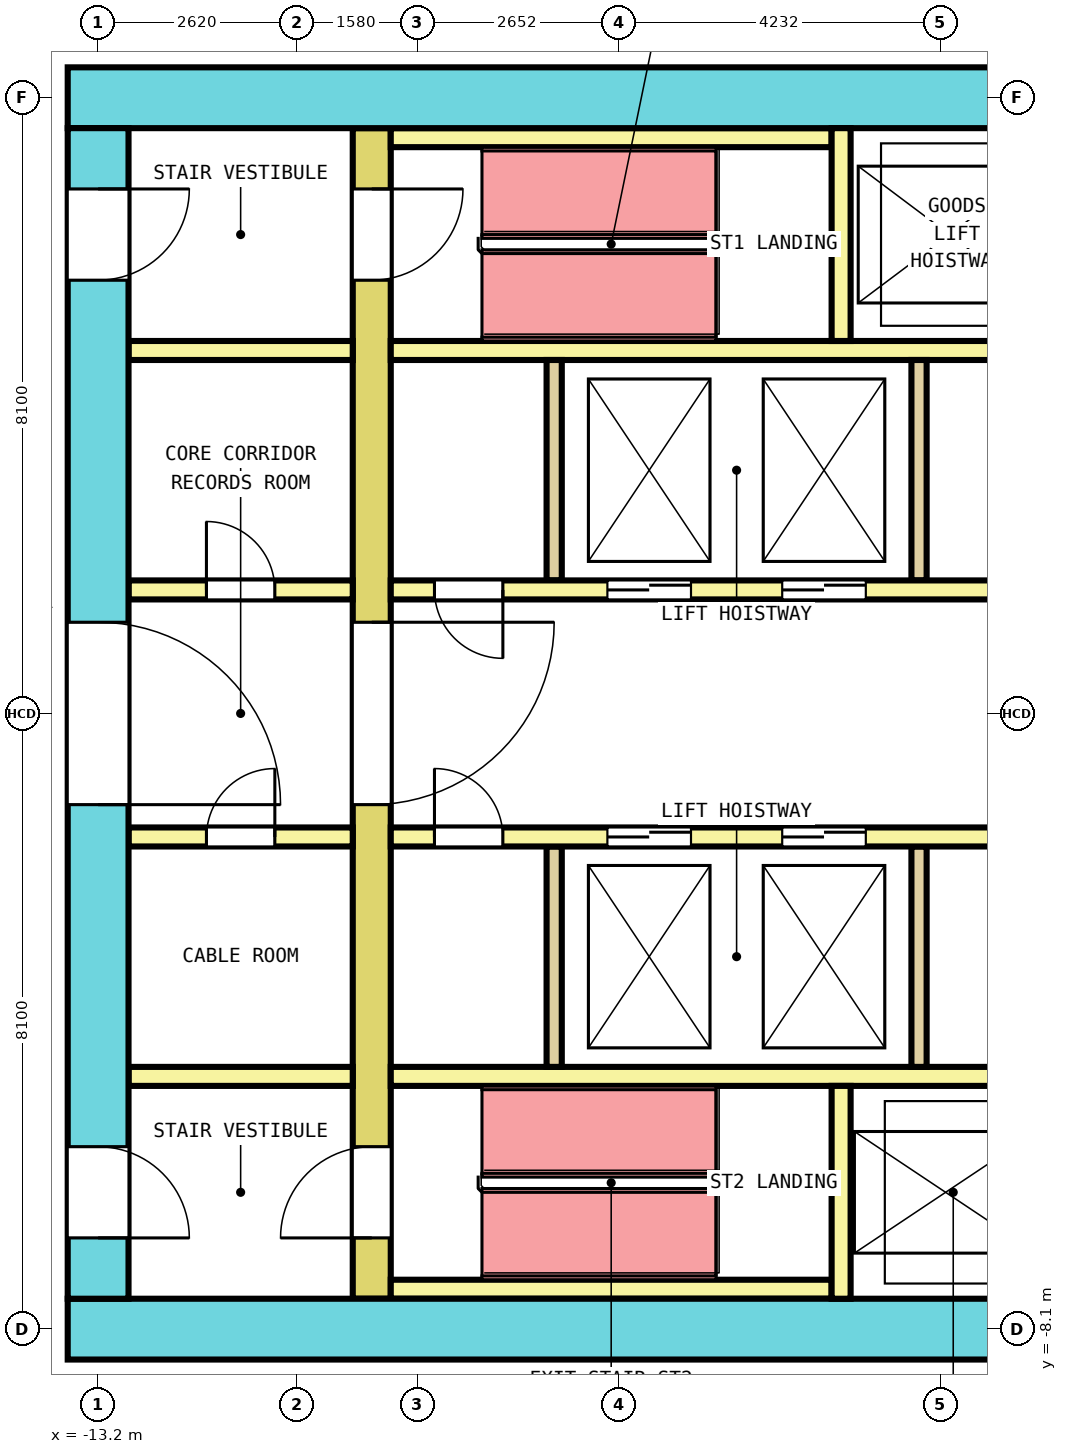
"""IFC4 building model, lengths in metres.
Left out: names, types, materials, properties, quantities, classifications, styles, units other than length and angle.
Written with IfcOpenShell. Run it as: python <this file> out.ifc"""

import sys

from ifc_helpers import new_model, si_unit, direction, frame, frame_2d, origin, place, context, subcontext, project, spatial, rectangle, extrude, element, fill, save


model = new_model("IFC4")
c1 = context("Model", 3, precision=1e-05, world=origin(), true_north=direction((0.0, 1.0)))
c2 = subcontext(c1, "Body", "Model", "MODEL_VIEW")
j1 = project(units=[si_unit("LENGTHUNIT", "METRE"), si_unit("PLANEANGLEUNIT", "RADIAN")], contexts=[c1])
p1 = place(None, origin())
s1 = spatial("IfcSite", under=j1, at=p1, CompositionType="ELEMENT")
p2 = place(p1, origin())
s2 = spatial("IfcBuilding", under=s1, at=p2, CompositionType="ELEMENT")
p3 = place(p2, frame((0.0, 0.0, 126.4)))
s3 = spatial("IfcBuildingStorey", under=s2, at=p3, CompositionType="ELEMENT", Elevation=126.4)
p4 = place(p3, frame((-13.6, 8.1, 0.0), z_axis=(0.0, 0.0, 1.0), x_axis=(1.0, 0.0, 0.0)))
e1 = element("IfcWall", 1, at=p4, inside=s3, PredefinedType="SHEAR", context=c2, shape_type="SweptSolid", body=[
    extrude(rectangle(XDim=27.2, YDim=0.8, at=frame_2d((13.6, 0.0))), origin(), (0.0, 0.0, 1.0), 4.1),
])
p5 = place(p4, frame((14.525, 0.0, 0.0)))
e2 = element("IfcOpeningElement", 2, at=p5, cuts=e1, PredefinedType="OPENING", context=c2, shape_type="SweptSolid", body=[
    extrude(rectangle(XDim=1.4, YDim=2.1, at=frame_2d((0.7, 1.05))), frame((0.0, 0.41, 0.0), z_axis=(0.0, -1.0, 0.0), x_axis=(1.0, 0.0, 0.0)), (0.0, 0.0, 1.0), 0.82),
])
p6 = place(p3, frame((-13.6, -8.1, 0.0), z_axis=(0.0, 0.0, 1.0), x_axis=(1.0, 0.0, 0.0)))
e3 = element("IfcWall", 3, at=p6, inside=s3, PredefinedType="SHEAR", context=c2, shape_type="SweptSolid", body=[
    extrude(rectangle(XDim=27.2, YDim=0.8, at=frame_2d((13.6, 0.0))), origin(), (0.0, 0.0, 1.0), 4.1),
])
p7 = place(p6, frame((15.15, 0.0, 0.0)))
e4 = element("IfcOpeningElement", 4, at=p7, cuts=e3, PredefinedType="OPENING", context=c2, shape_type="SweptSolid", body=[
    extrude(rectangle(XDim=1.2, YDim=2.1, at=frame_2d((0.6, 1.05))), frame((0.0, 0.41, 0.0), z_axis=(0.0, -1.0, 0.0), x_axis=(1.0, 0.0, 0.0)), (0.0, 0.0, 1.0), 0.82),
])
p8 = place(p3, frame((-13.2, -7.7, 0.0), z_axis=(0.0, 0.0, 1.0), x_axis=(0.0, 1.0, 0.0)))
e5 = element("IfcWall", 5, at=p8, inside=s3, PredefinedType="SHEAR", context=c2, shape_type="SweptSolid", body=[
    extrude(rectangle(XDim=15.4, YDim=0.8, at=frame_2d((7.7, 0.0))), origin(), (0.0, 0.0, 1.0), 4.1),
])
p9 = place(p8, frame((6.5, 0.0, 0.0)))
e6 = element("IfcOpeningElement", 6, at=p9, cuts=e5, PredefinedType="OPENING", context=c2, shape_type="SweptSolid", body=[
    extrude(rectangle(XDim=2.4, YDim=2.1, at=frame_2d((1.2, 1.05))), frame((0.0, 0.41, 0.0), z_axis=(0.0, -1.0, 0.0), x_axis=(1.0, 0.0, 0.0)), (0.0, 0.0, 1.0), 0.82),
])
p10 = place(p8, frame((13.4, 0.0, 0.0)))
e7 = element("IfcOpeningElement", 7, at=p10, cuts=e5, PredefinedType="OPENING", context=c2, shape_type="SweptSolid", body=[
    extrude(rectangle(XDim=1.2, YDim=2.1, at=frame_2d((0.6, 1.05))), frame((0.0, 0.41, 0.0), z_axis=(0.0, -1.0, 0.0), x_axis=(1.0, 0.0, 0.0)), (0.0, 0.0, 1.0), 0.82),
])
p11 = place(p8, frame((0.8, 0.0, 0.0)))
e8 = element("IfcOpeningElement", 8, at=p11, cuts=e5, PredefinedType="OPENING", context=c2, shape_type="SweptSolid", body=[
    extrude(rectangle(XDim=1.2, YDim=2.1, at=frame_2d((0.6, 1.05))), frame((0.0, 0.41, 0.0), z_axis=(0.0, -1.0, 0.0), x_axis=(1.0, 0.0, 0.0)), (0.0, 0.0, 1.0), 0.82),
])
p12 = place(p3, frame((-9.6, -7.7, 0.0), z_axis=(0.0, 0.0, 1.0), x_axis=(0.0, 1.0, 0.0)))
e9 = element("IfcWall", 9, at=p12, inside=s3, PredefinedType="SHEAR", context=c2, shape_type="SweptSolid", body=[
    extrude(rectangle(XDim=15.4, YDim=0.5, at=frame_2d((7.7, 0.0))), origin(), (0.0, 0.0, 1.0), 4.1),
])
p13 = place(p12, frame((6.5, 0.0, 0.0)))
e10 = element("IfcOpeningElement", 10, at=p13, cuts=e9, PredefinedType="OPENING", context=c2, shape_type="SweptSolid", body=[
    extrude(rectangle(XDim=2.4, YDim=2.1, at=frame_2d((1.2, 1.05))), frame((0.0, 0.26, 0.0), z_axis=(0.0, -1.0, 0.0), x_axis=(1.0, 0.0, 0.0)), (0.0, 0.0, 1.0), 0.52),
])
p14 = place(p12, frame((13.4, 0.0, 0.0)))
e11 = element("IfcOpeningElement", 11, at=p14, cuts=e9, PredefinedType="OPENING", context=c2, shape_type="SweptSolid", body=[
    extrude(rectangle(XDim=1.2, YDim=2.1, at=frame_2d((0.6, 1.05))), frame((0.0, 0.26, 0.0), z_axis=(0.0, -1.0, 0.0), x_axis=(1.0, 0.0, 0.0)), (0.0, 0.0, 1.0), 0.52),
])
p15 = place(p12, frame((0.8, 0.0, 0.0)))
e12 = element("IfcOpeningElement", 12, at=p15, cuts=e9, PredefinedType="OPENING", context=c2, shape_type="SweptSolid", body=[
    extrude(rectangle(XDim=1.2, YDim=2.1, at=frame_2d((0.6, 1.05))), frame((0.0, 0.26, 0.0), z_axis=(0.0, -1.0, 0.0), x_axis=(1.0, 0.0, 0.0)), (0.0, 0.0, 1.0), 0.52),
])
p16 = place(p3, frame((-12.8, 1.625, 0.0), z_axis=(0.0, 0.0, 1.0), x_axis=(1.0, 0.0, 0.0)))
e13 = element("IfcWall", 13, at=p16, inside=s3, PredefinedType="SOLIDWALL", context=c2, shape_type="SweptSolid", body=[
    extrude(rectangle(XDim=2.95, YDim=0.25, at=frame_2d((1.475, 0.0))), origin(), (0.0, 0.0, 1.0), 4.1),
])
p17 = place(p16, frame((1.025, 0.0, 0.0)))
e14 = element("IfcOpeningElement", 14, at=p17, cuts=e13, PredefinedType="OPENING", context=c2, shape_type="SweptSolid", body=[
    extrude(rectangle(XDim=0.9, YDim=2.1, at=frame_2d((0.45, 1.05))), frame((0.0, 0.135, 0.0), z_axis=(0.0, -1.0, 0.0), x_axis=(1.0, 0.0, 0.0)), (0.0, 0.0, 1.0), 0.27),
])
p18 = place(p3, frame((-9.35, 1.625, 0.0), z_axis=(0.0, 0.0, 1.0), x_axis=(1.0, 0.0, 0.0)))
e15 = element("IfcWall", 15, at=p18, inside=s3, PredefinedType="SOLIDWALL", context=c2, shape_type="SweptSolid", body=[
    extrude(rectangle(XDim=18.7, YDim=0.25, at=frame_2d((9.35, 0.0))), origin(), (0.0, 0.0, 1.0), 4.1),
])
p19 = place(p18, frame((2.85, 0.0, 0.0)))
e16 = element("IfcOpeningElement", 16, at=p19, cuts=e15, PredefinedType="OPENING", context=c2, shape_type="SweptSolid", body=[
    extrude(rectangle(XDim=1.1, YDim=2.1, at=frame_2d((0.55, 1.05))), frame((0.0, 0.135, 0.0), z_axis=(0.0, -1.0, 0.0), x_axis=(1.0, 0.0, 0.0)), (0.0, 0.0, 1.0), 0.27),
])
p20 = place(p18, frame((5.15, 0.0, 0.0)))
e17 = element("IfcOpeningElement", 17, at=p20, cuts=e15, PredefinedType="OPENING", context=c2, shape_type="SweptSolid", body=[
    extrude(rectangle(XDim=1.1, YDim=2.1, at=frame_2d((0.55, 1.05))), frame((0.0, 0.135, 0.0), z_axis=(0.0, -1.0, 0.0), x_axis=(1.0, 0.0, 0.0)), (0.0, 0.0, 1.0), 0.27),
])
p21 = place(p18, frame((14.8, 0.0, 0.0)))
e18 = element("IfcOpeningElement", 18, at=p21, cuts=e15, PredefinedType="OPENING", context=c2, shape_type="SweptSolid", body=[
    extrude(rectangle(XDim=1.1, YDim=2.1, at=frame_2d((0.55, 1.05))), frame((0.0, 0.135, 0.0), z_axis=(0.0, -1.0, 0.0), x_axis=(1.0, 0.0, 0.0)), (0.0, 0.0, 1.0), 0.27),
])
p22 = place(p18, frame((0.575, 0.0, 0.0)))
e19 = element("IfcOpeningElement", 19, at=p22, cuts=e15, PredefinedType="OPENING", context=c2, shape_type="SweptSolid", body=[
    extrude(rectangle(XDim=0.9, YDim=2.1, at=frame_2d((0.45, 1.05))), frame((0.0, 0.135, 0.0), z_axis=(0.0, -1.0, 0.0), x_axis=(1.0, 0.0, 0.0)), (0.0, 0.0, 1.0), 0.27),
])
p23 = place(p18, frame((17.225, 0.0, 0.0)))
e20 = element("IfcOpeningElement", 20, at=p23, cuts=e15, PredefinedType="OPENING", context=c2, shape_type="SweptSolid", body=[
    extrude(rectangle(XDim=0.9, YDim=2.1, at=frame_2d((0.45, 1.05))), frame((0.0, 0.135, 0.0), z_axis=(0.0, -1.0, 0.0), x_axis=(1.0, 0.0, 0.0)), (0.0, 0.0, 1.0), 0.27),
])
p24 = place(p3, frame((-12.8, 4.775, 0.0), z_axis=(0.0, 0.0, 1.0), x_axis=(1.0, 0.0, 0.0)))
e21 = element("IfcWall", 21, at=p24, inside=s3, PredefinedType="SOLIDWALL", context=c2, shape_type="SweptSolid", body=[
    extrude(rectangle(XDim=2.95, YDim=0.25, at=frame_2d((1.475, 0.0))), origin(), (0.0, 0.0, 1.0), 4.1),
])
p25 = place(p3, frame((-9.35, 4.775, 0.0), z_axis=(0.0, 0.0, 1.0), x_axis=(1.0, 0.0, 0.0)))
e22 = element("IfcWall", 22, at=p25, inside=s3, PredefinedType="SOLIDWALL", context=c2, shape_type="SweptSolid", body=[
    extrude(rectangle(XDim=18.7, YDim=0.25, at=frame_2d((9.35, 0.0))), origin(), (0.0, 0.0, 1.0), 4.1),
])
for number, where, z_axis, x_axis in (
    (23, (-7.2, 1.75, 0.0), (0.0, 0.0, 1.0), (0.0, 1.0, 0.0)),
    (24, (-2.4, 1.75, 0.0), (0.0, 0.0, 1.0), (0.0, 1.0, 0.0)),
):
    element("IfcWall", number, at=place(p3, frame(where, z_axis=z_axis, x_axis=x_axis)), inside=s3, PredefinedType="SOLIDWALL", context=c2, shape_type="SweptSolid", body=[
        extrude(rectangle(XDim=2.9, YDim=0.2, at=frame_2d((1.45, 0.0))), origin(), (0.0, 0.0, 1.0), 4.1),
    ])
p26 = place(p3, frame((-12.8, -1.625, 0.0), z_axis=(0.0, 0.0, 1.0), x_axis=(1.0, 0.0, 0.0)))
e25 = element("IfcWall", 25, at=p26, inside=s3, PredefinedType="SOLIDWALL", context=c2, shape_type="SweptSolid", body=[
    extrude(rectangle(XDim=2.95, YDim=0.25, at=frame_2d((1.475, 0.0))), origin(), (0.0, 0.0, 1.0), 4.1),
])
p27 = place(p26, frame((1.025, 0.0, 0.0)))
e26 = element("IfcOpeningElement", 26, at=p27, cuts=e25, PredefinedType="OPENING", context=c2, shape_type="SweptSolid", body=[
    extrude(rectangle(XDim=0.9, YDim=2.1, at=frame_2d((0.45, 1.05))), frame((0.0, 0.135, 0.0), z_axis=(0.0, -1.0, 0.0), x_axis=(1.0, 0.0, 0.0)), (0.0, 0.0, 1.0), 0.27),
])
p28 = place(p3, frame((-9.35, -1.625, 0.0), z_axis=(0.0, 0.0, 1.0), x_axis=(1.0, 0.0, 0.0)))
e27 = element("IfcWall", 27, at=p28, inside=s3, PredefinedType="SOLIDWALL", context=c2, shape_type="SweptSolid", body=[
    extrude(rectangle(XDim=18.7, YDim=0.25, at=frame_2d((9.35, 0.0))), origin(), (0.0, 0.0, 1.0), 4.1),
])
p29 = place(p28, frame((2.85, 0.0, 0.0)))
e28 = element("IfcOpeningElement", 28, at=p29, cuts=e27, PredefinedType="OPENING", context=c2, shape_type="SweptSolid", body=[
    extrude(rectangle(XDim=1.1, YDim=2.1, at=frame_2d((0.55, 1.05))), frame((0.0, 0.135, 0.0), z_axis=(0.0, -1.0, 0.0), x_axis=(1.0, 0.0, 0.0)), (0.0, 0.0, 1.0), 0.27),
])
p30 = place(p28, frame((5.15, 0.0, 0.0)))
e29 = element("IfcOpeningElement", 29, at=p30, cuts=e27, PredefinedType="OPENING", context=c2, shape_type="SweptSolid", body=[
    extrude(rectangle(XDim=1.1, YDim=2.1, at=frame_2d((0.55, 1.05))), frame((0.0, 0.135, 0.0), z_axis=(0.0, -1.0, 0.0), x_axis=(1.0, 0.0, 0.0)), (0.0, 0.0, 1.0), 0.27),
])
p31 = place(p28, frame((14.8, 0.0, 0.0)))
e30 = element("IfcOpeningElement", 30, at=p31, cuts=e27, PredefinedType="OPENING", context=c2, shape_type="SweptSolid", body=[
    extrude(rectangle(XDim=1.1, YDim=2.1, at=frame_2d((0.55, 1.05))), frame((0.0, 0.135, 0.0), z_axis=(0.0, -1.0, 0.0), x_axis=(1.0, 0.0, 0.0)), (0.0, 0.0, 1.0), 0.27),
])
p32 = place(p28, frame((0.575, 0.0, 0.0)))
e31 = element("IfcOpeningElement", 31, at=p32, cuts=e27, PredefinedType="OPENING", context=c2, shape_type="SweptSolid", body=[
    extrude(rectangle(XDim=0.9, YDim=2.1, at=frame_2d((0.45, 1.05))), frame((0.0, 0.135, 0.0), z_axis=(0.0, -1.0, 0.0), x_axis=(1.0, 0.0, 0.0)), (0.0, 0.0, 1.0), 0.27),
])
p33 = place(p28, frame((17.225, 0.0, 0.0)))
e32 = element("IfcOpeningElement", 32, at=p33, cuts=e27, PredefinedType="OPENING", context=c2, shape_type="SweptSolid", body=[
    extrude(rectangle(XDim=0.9, YDim=2.1, at=frame_2d((0.45, 1.05))), frame((0.0, 0.135, 0.0), z_axis=(0.0, -1.0, 0.0), x_axis=(1.0, 0.0, 0.0)), (0.0, 0.0, 1.0), 0.27),
])
p34 = place(p3, frame((-12.8, -4.775, 0.0), z_axis=(0.0, 0.0, 1.0), x_axis=(1.0, 0.0, 0.0)))
e33 = element("IfcWall", 33, at=p34, inside=s3, PredefinedType="SOLIDWALL", context=c2, shape_type="SweptSolid", body=[
    extrude(rectangle(XDim=2.95, YDim=0.25, at=frame_2d((1.475, 0.0))), origin(), (0.0, 0.0, 1.0), 4.1),
])
p35 = place(p3, frame((-9.35, -4.775, 0.0), z_axis=(0.0, 0.0, 1.0), x_axis=(1.0, 0.0, 0.0)))
e34 = element("IfcWall", 34, at=p35, inside=s3, PredefinedType="SOLIDWALL", context=c2, shape_type="SweptSolid", body=[
    extrude(rectangle(XDim=18.7, YDim=0.25, at=frame_2d((9.35, 0.0))), origin(), (0.0, 0.0, 1.0), 4.1),
])
for number, where, z_axis, x_axis in (
    (35, (-7.2, -4.65, 0.0), (0.0, 0.0, 1.0), (0.0, 1.0, 0.0)),
    (36, (-2.4, -4.65, 0.0), (0.0, 0.0, 1.0), (0.0, 1.0, 0.0)),
):
    element("IfcWall", number, at=place(p3, frame(where, z_axis=z_axis, x_axis=x_axis)), inside=s3, PredefinedType="SOLIDWALL", context=c2, shape_type="SweptSolid", body=[
        extrude(rectangle(XDim=2.9, YDim=0.2, at=frame_2d((1.45, 0.0))), origin(), (0.0, 0.0, 1.0), 4.1),
    ])
p36 = place(p3, frame((-9.35, 7.575, 0.0), z_axis=(0.0, 0.0, 1.0), x_axis=(1.0, 0.0, 0.0)))
e37 = element("IfcWall", 37, at=p36, inside=s3, PredefinedType="SOLIDWALL", context=c2, shape_type="SweptSolid", body=[
    extrude(rectangle(XDim=5.8, YDim=0.25, at=frame_2d((2.9, 0.0))), origin(), (0.0, 0.0, 1.0), 4.1),
])
p37 = place(p3, frame((-3.425, 4.9, 0.0), z_axis=(0.0, 0.0, 1.0), x_axis=(0.0, 1.0, 0.0)))
e38 = element("IfcWall", 38, at=p37, inside=s3, PredefinedType="SOLIDWALL", context=c2, shape_type="SweptSolid", body=[
    extrude(rectangle(XDim=2.8, YDim=0.25, at=frame_2d((1.4, 0.0))), origin(), (0.0, 0.0, 1.0), 4.1),
])
p38 = place(p3, frame((-9.35, -7.575, 0.0), z_axis=(0.0, 0.0, 1.0), x_axis=(1.0, 0.0, 0.0)))
e39 = element("IfcWall", 39, at=p38, inside=s3, PredefinedType="SOLIDWALL", context=c2, shape_type="SweptSolid", body=[
    extrude(rectangle(XDim=5.8, YDim=0.25, at=frame_2d((2.9, 0.0))), origin(), (0.0, 0.0, 1.0), 4.1),
])
p39 = place(p3, frame((-3.425, -7.7, 0.0), z_axis=(0.0, 0.0, 1.0), x_axis=(0.0, 1.0, 0.0)))
e40 = element("IfcWall", 40, at=p39, inside=s3, PredefinedType="SOLIDWALL", context=c2, shape_type="SweptSolid", body=[
    extrude(rectangle(XDim=2.8, YDim=0.25, at=frame_2d((1.4, 0.0))), origin(), (0.0, 0.0, 1.0), 4.1),
])
p40 = place(p19, origin())
e41 = element("IfcDoor", 41, at=p40, inside=s3, OperationType="DOUBLE_DOOR_SLIDING", PredefinedType="DOOR", context=c2, shape_type="SweptSolid", body=[
    extrude(rectangle(XDim=1.1, YDim=2.1, at=frame_2d((0.55, 1.05))), frame((0.0, 0.075, 0.0), z_axis=(0.0, -1.0, 0.0), x_axis=(1.0, 0.0, 0.0)), (0.0, 0.0, 1.0), 0.15),
])
fill(e16, e41)
p41 = place(p20, origin())
e42 = element("IfcDoor", 42, at=p41, inside=s3, OperationType="DOUBLE_DOOR_SLIDING", PredefinedType="DOOR", context=c2, shape_type="SweptSolid", body=[
    extrude(rectangle(XDim=1.1, YDim=2.1, at=frame_2d((0.55, 1.05))), frame((0.0, 0.075, 0.0), z_axis=(0.0, -1.0, 0.0), x_axis=(1.0, 0.0, 0.0)), (0.0, 0.0, 1.0), 0.15),
])
fill(e17, e42)
p42 = place(p29, origin())
e43 = element("IfcDoor", 43, at=p42, inside=s3, OperationType="DOUBLE_DOOR_SLIDING", PredefinedType="DOOR", context=c2, shape_type="SweptSolid", body=[
    extrude(rectangle(XDim=1.1, YDim=2.1, at=frame_2d((0.55, 1.05))), frame((0.0, 0.075, 0.0), z_axis=(0.0, -1.0, 0.0), x_axis=(1.0, 0.0, 0.0)), (0.0, 0.0, 1.0), 0.15),
])
fill(e28, e43)
p43 = place(p30, origin())
e44 = element("IfcDoor", 44, at=p43, inside=s3, OperationType="DOUBLE_DOOR_SLIDING", PredefinedType="DOOR", context=c2, shape_type="SweptSolid", body=[
    extrude(rectangle(XDim=1.1, YDim=2.1, at=frame_2d((0.55, 1.05))), frame((0.0, 0.075, 0.0), z_axis=(0.0, -1.0, 0.0), x_axis=(1.0, 0.0, 0.0)), (0.0, 0.0, 1.0), 0.15),
])
fill(e29, e44)
p44 = place(p13, origin())
e45 = element("IfcDoor", 45, at=p44, inside=s3, OperationType="DOUBLE_DOOR_SINGLE_SWING", PredefinedType="DOOR", context=c2, shape_type="SweptSolid", body=[
    extrude(rectangle(XDim=2.4, YDim=2.1, at=frame_2d((1.2, 1.05))), frame((0.0, 0.2, 0.0), z_axis=(0.0, -1.0, 0.0), x_axis=(1.0, 0.0, 0.0)), (0.0, 0.0, 1.0), 0.4),
])
fill(e10, e45)
p45 = place(p9, origin())
e46 = element("IfcDoor", 46, at=p45, inside=s3, OperationType="DOUBLE_DOOR_SINGLE_SWING", PredefinedType="DOOR", context=c2, shape_type="SweptSolid", body=[
    extrude(rectangle(XDim=2.4, YDim=2.1, at=frame_2d((1.2, 1.05))), frame((0.0, 0.3, 0.0), z_axis=(0.0, -1.0, 0.0), x_axis=(1.0, 0.0, 0.0)), (0.0, 0.0, 1.0), 0.6),
])
fill(e6, e46)
p46 = place(p14, origin())
e47 = element("IfcDoor", 47, at=p46, inside=s3, OperationType="SINGLE_SWING_RIGHT", PredefinedType="DOOR", context=c2, shape_type="SweptSolid", body=[
    extrude(rectangle(XDim=1.2, YDim=2.1, at=frame_2d((0.6, 1.05))), frame((0.0, 0.2, 0.0), z_axis=(0.0, -1.0, 0.0), x_axis=(1.0, 0.0, 0.0)), (0.0, 0.0, 1.0), 0.4),
])
fill(e11, e47)
p47 = place(p10, origin())
e48 = element("IfcDoor", 48, at=p47, inside=s3, OperationType="SINGLE_SWING_LEFT", PredefinedType="DOOR", context=c2, shape_type="SweptSolid", body=[
    extrude(rectangle(XDim=1.2, YDim=2.1, at=frame_2d((0.6, 1.05))), frame((0.0, 0.3, 0.0), z_axis=(0.0, -1.0, 0.0), x_axis=(1.0, 0.0, 0.0)), (0.0, 0.0, 1.0), 0.6),
])
fill(e7, e48)
p48 = place(p15, origin())
e49 = element("IfcDoor", 49, at=p48, inside=s3, OperationType="SINGLE_SWING_RIGHT", PredefinedType="DOOR", context=c2, shape_type="SweptSolid", body=[
    extrude(rectangle(XDim=1.2, YDim=2.1, at=frame_2d((0.6, 1.05))), frame((0.0, 0.2, 0.0), z_axis=(0.0, -1.0, 0.0), x_axis=(1.0, 0.0, 0.0)), (0.0, 0.0, 1.0), 0.4),
])
fill(e12, e49)
p49 = place(p11, origin())
e50 = element("IfcDoor", 50, at=p49, inside=s3, OperationType="SINGLE_SWING_LEFT", PredefinedType="DOOR", context=c2, shape_type="SweptSolid", body=[
    extrude(rectangle(XDim=1.2, YDim=2.1, at=frame_2d((0.6, 1.05))), frame((0.0, 0.3, 0.0), z_axis=(0.0, -1.0, 0.0), x_axis=(1.0, 0.0, 0.0)), (0.0, 0.0, 1.0), 0.6),
])
fill(e8, e50)
p50 = place(p17, origin())
e51 = element("IfcDoor", 51, at=p50, inside=s3, OperationType="SINGLE_SWING_RIGHT", PredefinedType="DOOR", context=c2, shape_type="SweptSolid", body=[
    extrude(rectangle(XDim=0.9, YDim=2.1, at=frame_2d((0.45, 1.05))), frame((0.0, 0.075, 0.0), z_axis=(0.0, -1.0, 0.0), x_axis=(1.0, 0.0, 0.0)), (0.0, 0.0, 1.0), 0.15),
])
fill(e14, e51)
p51 = place(p22, origin())
e52 = element("IfcDoor", 52, at=p51, inside=s3, OperationType="SINGLE_SWING_LEFT", PredefinedType="DOOR", context=c2, shape_type="SweptSolid", body=[
    extrude(rectangle(XDim=0.9, YDim=2.1, at=frame_2d((0.45, 1.05))), frame((0.0, 0.075, 0.0), z_axis=(0.0, -1.0, 0.0), x_axis=(1.0, 0.0, 0.0)), (0.0, 0.0, 1.0), 0.15),
])
fill(e19, e52)
p52 = place(p27, origin())
e53 = element("IfcDoor", 53, at=p52, inside=s3, OperationType="SINGLE_SWING_RIGHT", PredefinedType="DOOR", context=c2, shape_type="SweptSolid", body=[
    extrude(rectangle(XDim=0.9, YDim=2.1, at=frame_2d((0.45, 1.05))), frame((0.0, 0.075, 0.0), z_axis=(0.0, -1.0, 0.0), x_axis=(1.0, 0.0, 0.0)), (0.0, 0.0, 1.0), 0.15),
])
fill(e26, e53)
p53 = place(p32, origin())
e54 = element("IfcDoor", 54, at=p53, inside=s3, OperationType="SINGLE_SWING_LEFT", PredefinedType="DOOR", context=c2, shape_type="SweptSolid", body=[
    extrude(rectangle(XDim=0.9, YDim=2.1, at=frame_2d((0.45, 1.05))), frame((0.0, 0.075, 0.0), z_axis=(0.0, -1.0, 0.0), x_axis=(1.0, 0.0, 0.0)), (0.0, 0.0, 1.0), 0.15),
])
fill(e31, e54)
save(model, sys.argv[1])
